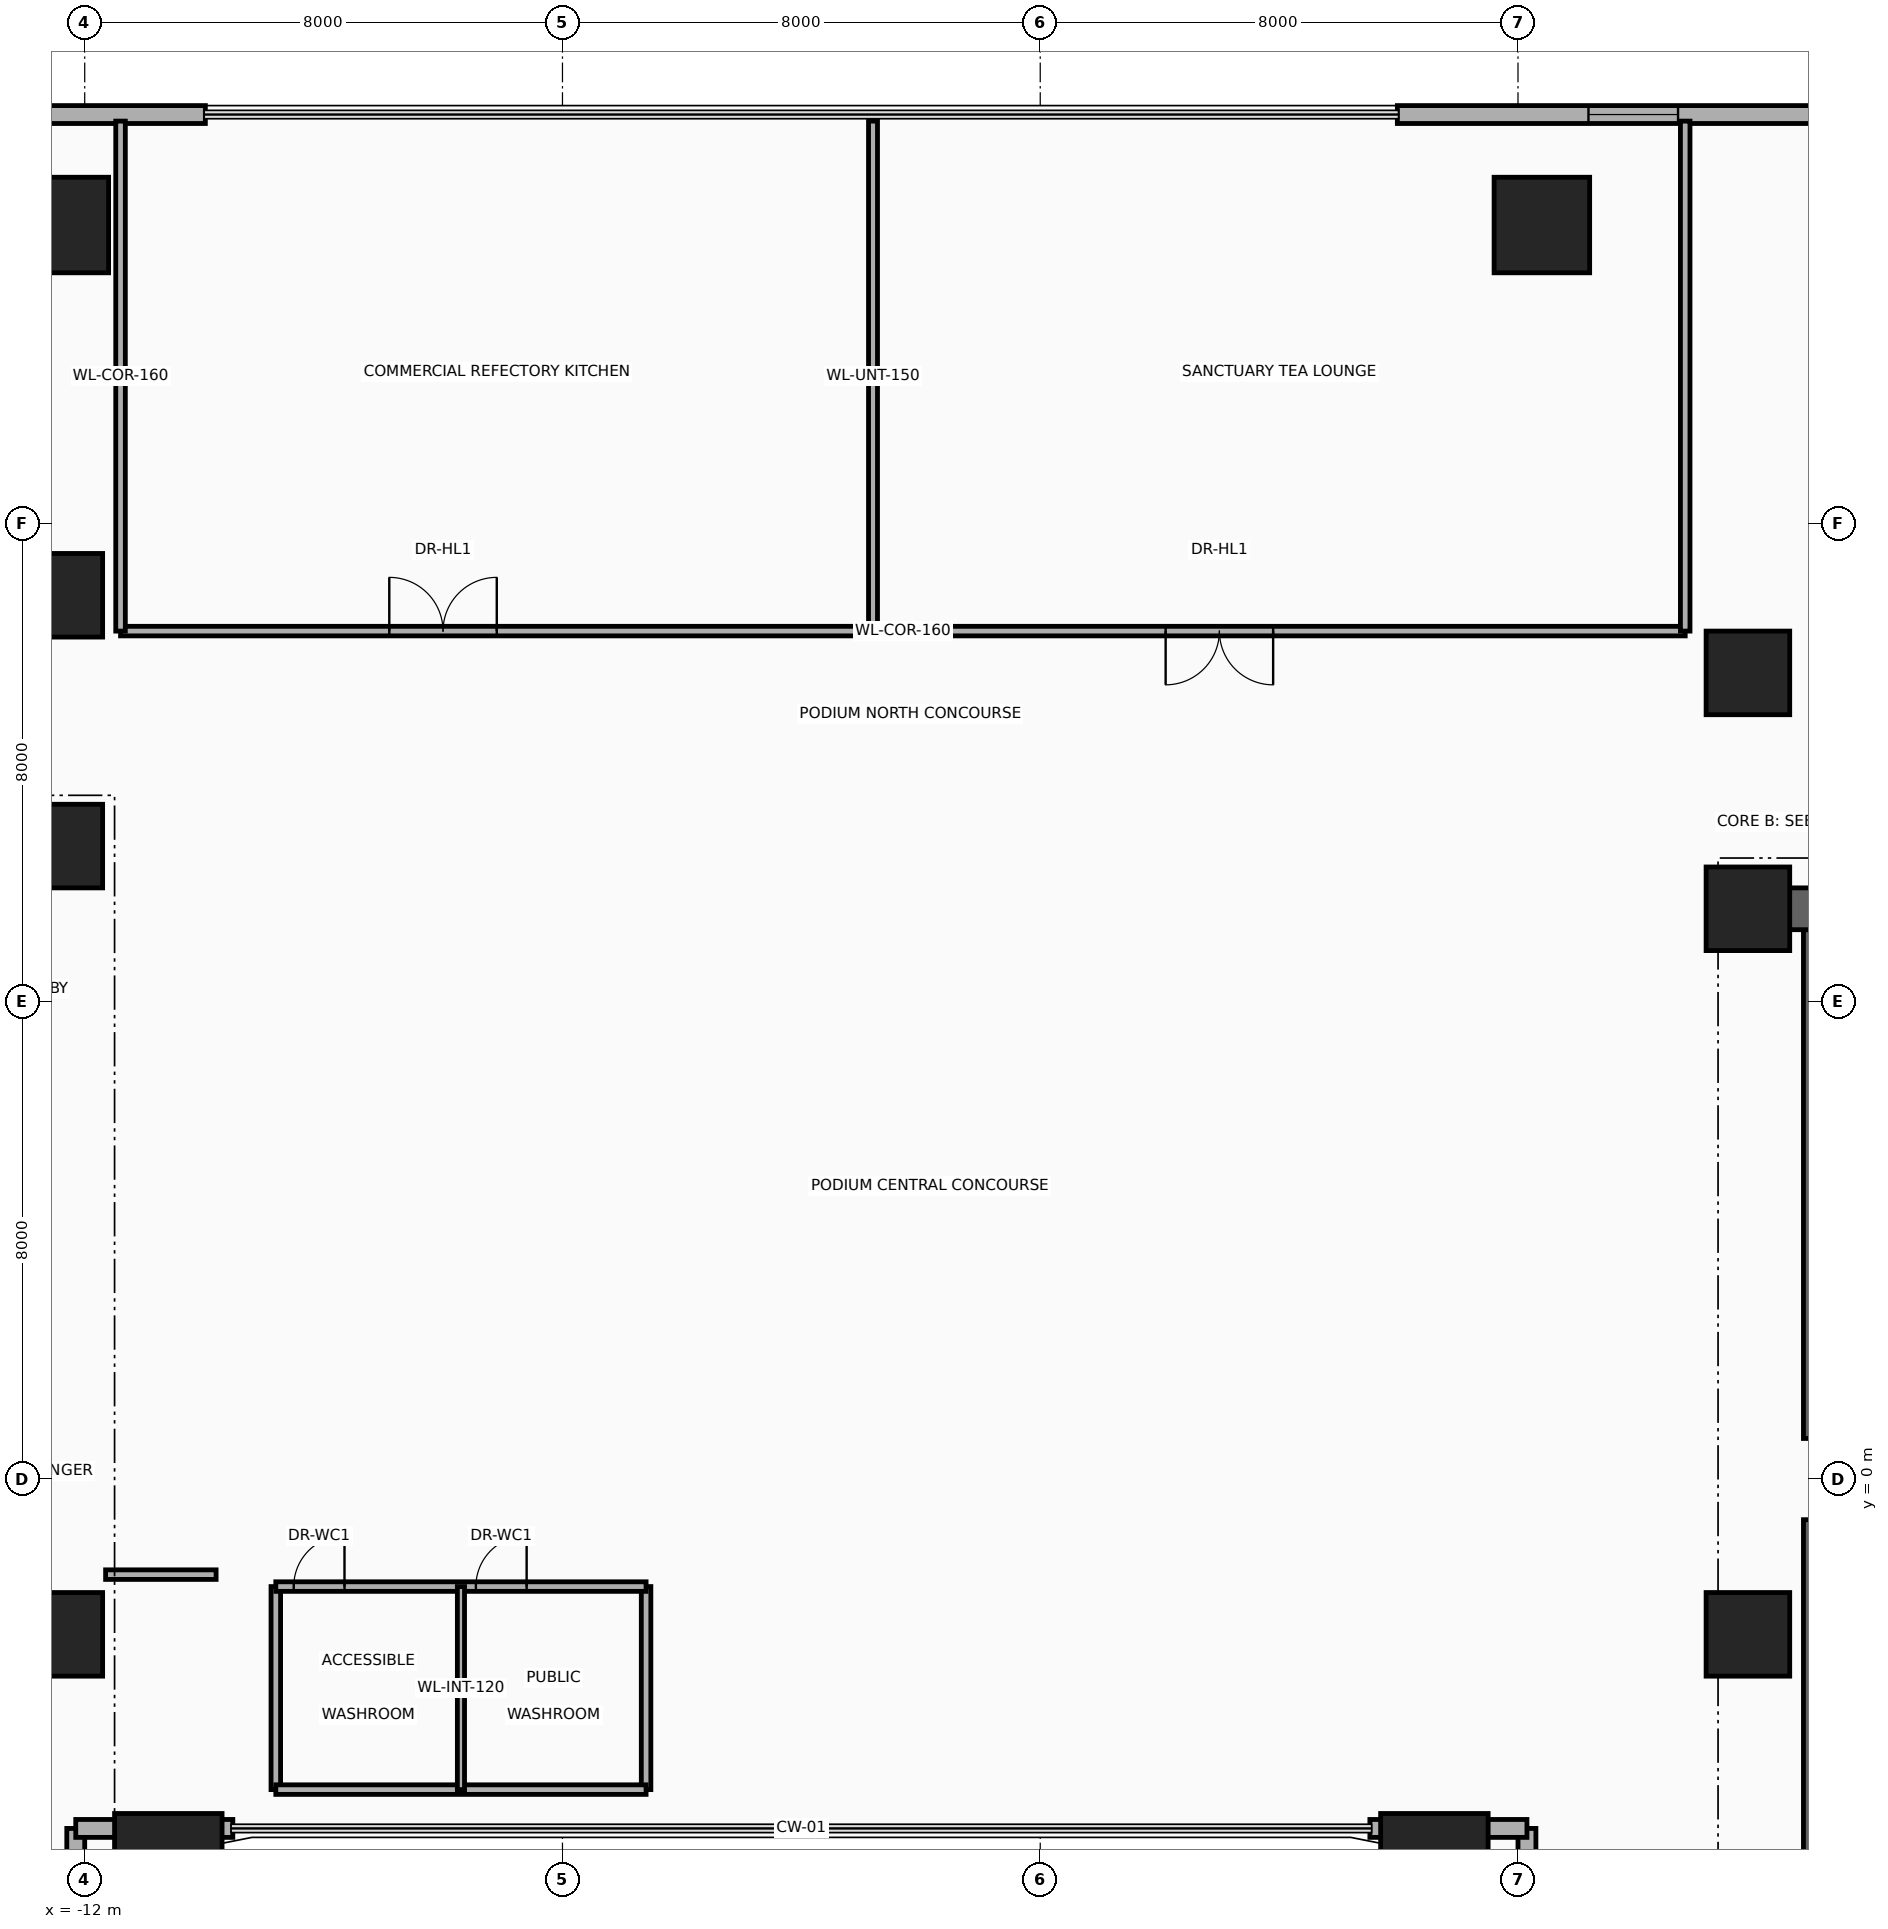
"""IFC4 building model, lengths in metres.
Left out: names, types, materials, properties, quantities, classifications, styles, units other than length and angle.
Written with IfcOpenShell. Run it as: python <this file> out.ifc"""

import sys

from ifc_helpers import new_model, si_unit, direction, frame, frame_2d, origin, origin_2d, place, context, subcontext, project, spatial, rectangle, extrude, source, transform, mapped, element, fill, save


model = new_model("IFC4")
c1 = context("Model", 3, precision=1e-05, world=origin(), true_north=direction((0.0, 1.0)))
c2 = subcontext(c1, "Body", "Model", "MODEL_VIEW")
j1 = project(units=[si_unit("LENGTHUNIT", "METRE"), si_unit("PLANEANGLEUNIT", "RADIAN")], contexts=[c1])
p1 = place(None, origin())
s1 = spatial("IfcSite", under=j1, at=p1, CompositionType="ELEMENT")
p2 = place(p1, origin())
s2 = spatial("IfcBuilding", under=s1, at=p2, CompositionType="ELEMENT")
p3 = place(p2, frame((0.0, 0.0, 10.4)))
s3 = spatial("IfcBuildingStorey", under=s2, at=p3, CompositionType="ELEMENT", Elevation=10.4)
for number, where, z_axis, x_axis in (
    (1, (16.89, 0.68, 0.0), (0.0, 0.0, 1.0), (0.0, 1.0, 0.0)),
    (2, (16.89, -9.2, 0.0), (0.0, 0.0, 1.0), (0.0, 1.0, 0.0)),
):
    element("IfcWall", number, at=place(p3, frame(where, z_axis=z_axis, x_axis=x_axis)), inside=s3, PredefinedType="SHEAR", context=c2, shape_type="SweptSolid", body=[
        extrude(rectangle(XDim=8.52, YDim=0.22, at=frame_2d((4.26, 0.0))), origin(), (0.0, 0.0, 1.0), 4.92),
    ])
p4 = place(p3, frame((-22.65, 10.8, 0.0), z_axis=(0.0, 0.0, 1.0), x_axis=(1.0, 0.0, 0.0)))
e3 = element("IfcWall", 3, at=p4, inside=s3, PredefinedType="SHEAR", context=c2, shape_type="SweptSolid", body=[
    extrude(rectangle(XDim=10.25, YDim=0.7, at=frame_2d((5.125, 0.0))), origin(), (0.0, 0.0, 1.0), 4.92),
])
p5 = place(p3, frame((15.85, 9.55, 0.0), z_axis=(0.0, 0.0, 1.0), x_axis=(1.0, 0.0, 0.0)))
e4 = element("IfcWall", 4, at=p5, inside=s3, PredefinedType="SHEAR", context=c2, shape_type="SweptSolid", body=[
    extrude(rectangle(XDim=9.0, YDim=0.7, at=frame_2d((4.5, 0.0))), origin(), (0.0, 0.0, 1.0), 4.92),
])
m1 = source(origin(), c2, "Body", "SweptSolid", [
    extrude(rectangle(XDim=1.4, YDim=1.4, at=origin_2d()), origin(), (0.0, 0.0, 1.0), 5.2),
])
for number, where, z_axis, x_axis in (
    (5, (-12.4, -2.6, 0.0), (0.0, 0.0, 1.0), (1.0, 0.0, 0.0)),
    (6, (-12.4, 10.6, 0.0), (0.0, 0.0, 1.0), (1.0, 0.0, 0.0)),
    (7, (-12.4, 14.8, 0.0), (0.0, 0.0, 1.0), (1.0, 0.0, 0.0)),
    (8, (15.85, -2.6, 0.0), (0.0, 0.0, 1.0), (1.0, 0.0, 0.0)),
    (9, (15.85, 9.55, 0.0), (0.0, 0.0, 1.0), (1.0, 0.0, 0.0)),
    (10, (15.85, 13.5, 0.0), (0.0, 0.0, 1.0), (1.0, 0.0, 0.0)),
):
    element("IfcColumn", number, at=place(p3, frame(where, z_axis=z_axis, x_axis=x_axis)), inside=s3, PredefinedType="COLUMN", context=c2, shape_type="MappedRepresentation", body=[
        mapped(m1, transform((0.0, 0.0, 0.0), x_axis=(1.0, 0.0, 0.0), y_axis=(0.0, 1.0, 0.0), z_axis=(0.0, 0.0, 1.0), scale=1.0)),
    ])
m2 = source(origin(), c2, "Body", "SweptSolid", [
    extrude(rectangle(XDim=1.8, YDim=1.8, at=origin_2d()), origin(), (0.0, 0.0, 1.0), 5.2),
])
for number, where, z_axis, x_axis in (
    (11, (-10.6, -6.5, 0.0), (0.0, 0.0, 1.0), (1.0, 0.0, 0.0)),
    (12, (10.6, -6.5, 0.0), (0.0, 0.0, 1.0), (1.0, 0.0, 0.0)),
):
    element("IfcColumn", number, at=place(p3, frame(where, z_axis=z_axis, x_axis=x_axis)), inside=s3, PredefinedType="COLUMN", context=c2, shape_type="MappedRepresentation", body=[
        mapped(m2, transform((0.0, 0.0, 0.0), x_axis=(1.0, 0.0, 0.0), y_axis=(0.0, 1.0, 0.0), z_axis=(0.0, 0.0, 1.0), scale=1.0)),
    ])
m3 = source(origin(), c2, "Body", "SweptSolid", [
    extrude(rectangle(XDim=1.6, YDim=1.6, at=origin_2d()), origin(), (0.0, 0.0, 1.0), 5.2),
])
for number, where, z_axis, x_axis in (
    (13, (-12.4, 21.0, 0.0), (0.0, 0.0, 1.0), (1.0, 0.0, 0.0)),
    (14, (12.4, 21.0, 0.0), (0.0, 0.0, 1.0), (1.0, 0.0, 0.0)),
):
    element("IfcColumn", number, at=place(p3, frame(where, z_axis=z_axis, x_axis=x_axis)), inside=s3, PredefinedType="COLUMN", context=c2, shape_type="MappedRepresentation", body=[
        mapped(m3, transform((0.0, 0.0, 0.0), x_axis=(1.0, 0.0, 0.0), y_axis=(0.0, 1.0, 0.0), z_axis=(0.0, 0.0, 1.0), scale=1.0)),
    ])
p6 = place(p3, frame((-33.85, 22.85, 0.0), z_axis=(0.0, 0.0, 1.0), x_axis=(1.0, 0.0, 0.0)))
e15 = element("IfcWall", 15, at=p6, inside=s3, PredefinedType="SOLIDWALL", context=c2, shape_type="SweptSolid", body=[
    extrude(rectangle(XDim=23.87, YDim=0.3, at=frame_2d((11.935, 0.0))), origin(), (0.0, 0.0, 1.0), 4.92),
])
p7 = place(p6, frame((3.2, 0.0, 0.9)))
e16 = element("IfcOpeningElement", 16, at=p7, cuts=e15, PredefinedType="OPENING", context=c2, shape_type="SweptSolid", body=[
    extrude(rectangle(XDim=1.5, YDim=1.75, at=frame_2d((0.75, 0.875))), frame((0.0, 0.165, 0.0), z_axis=(0.0, -1.0, 0.0), x_axis=(1.0, 0.0, 0.0)), (0.0, 0.0, 1.0), 0.33),
])
p8 = place(p6, frame((10.0, 0.0, 0.9)))
e17 = element("IfcOpeningElement", 17, at=p8, cuts=e15, PredefinedType="OPENING", context=c2, shape_type="SweptSolid", body=[
    extrude(rectangle(XDim=1.5, YDim=1.75, at=frame_2d((0.75, 0.875))), frame((0.0, 0.165, 0.0), z_axis=(0.0, -1.0, 0.0), x_axis=(1.0, 0.0, 0.0)), (0.0, 0.0, 1.0), 0.33),
])
p9 = place(p6, frame((17.8, 0.0, 0.9)))
e18 = element("IfcOpeningElement", 18, at=p9, cuts=e15, PredefinedType="OPENING", context=c2, shape_type="SweptSolid", body=[
    extrude(rectangle(XDim=1.5, YDim=1.75, at=frame_2d((0.75, 0.875))), frame((0.0, 0.165, 0.0), z_axis=(0.0, -1.0, 0.0), x_axis=(1.0, 0.0, 0.0)), (0.0, 0.0, 1.0), 0.33),
])
p10 = place(p3, frame((9.98, 22.85, 0.0), z_axis=(0.0, 0.0, 1.0), x_axis=(1.0, 0.0, 0.0)))
e19 = element("IfcWall", 19, at=p10, inside=s3, PredefinedType="SOLIDWALL", context=c2, shape_type="SweptSolid", body=[
    extrude(rectangle(XDim=23.87, YDim=0.3, at=frame_2d((11.935, 0.0))), origin(), (0.0, 0.0, 1.0), 4.92),
])
p11 = place(p10, frame((3.2, 0.0, 0.9)))
e20 = element("IfcOpeningElement", 20, at=p11, cuts=e19, PredefinedType="OPENING", context=c2, shape_type="SweptSolid", body=[
    extrude(rectangle(XDim=1.5, YDim=1.75, at=frame_2d((0.75, 0.875))), frame((0.0, 0.165, 0.0), z_axis=(0.0, -1.0, 0.0), x_axis=(1.0, 0.0, 0.0)), (0.0, 0.0, 1.0), 0.33),
])
p12 = place(p10, frame((10.0, 0.0, 0.9)))
e21 = element("IfcOpeningElement", 21, at=p12, cuts=e19, PredefinedType="OPENING", context=c2, shape_type="SweptSolid", body=[
    extrude(rectangle(XDim=1.5, YDim=1.75, at=frame_2d((0.75, 0.875))), frame((0.0, 0.165, 0.0), z_axis=(0.0, -1.0, 0.0), x_axis=(1.0, 0.0, 0.0)), (0.0, 0.0, 1.0), 0.33),
])
p13 = place(p10, frame((17.8, 0.0, 0.9)))
e22 = element("IfcOpeningElement", 22, at=p13, cuts=e19, PredefinedType="OPENING", context=c2, shape_type="SweptSolid", body=[
    extrude(rectangle(XDim=1.5, YDim=1.75, at=frame_2d((0.75, 0.875))), frame((0.0, 0.165, 0.0), z_axis=(0.0, -1.0, 0.0), x_axis=(1.0, 0.0, 0.0)), (0.0, 0.0, 1.0), 0.33),
])
for number, where, z_axis, x_axis in (
    (23, (-12.15, -22.85, 0.0), (0.0, 0.0, 1.0), (0.0, 1.0, 0.0)),
    (24, (12.15, -22.85, 0.0), (0.0, 0.0, 1.0), (0.0, 1.0, 0.0)),
):
    element("IfcWall", number, at=place(p3, frame(where, z_axis=z_axis, x_axis=x_axis)), inside=s3, PredefinedType="SOLIDWALL", context=c2, shape_type="SweptSolid", body=[
        extrude(rectangle(XDim=17.0, YDim=0.3, at=frame_2d((8.5, 0.0))), origin(), (0.0, 0.0, 1.0), 3.957),
    ])
for number, where, z_axis, x_axis in (
    (25, (-12.15, -5.85, 0.0), (0.0, 0.0, 1.0), (1.0, 0.0, 0.0)),
    (26, (9.52, -5.85, 0.0), (0.0, 0.0, 1.0), (1.0, 0.0, 0.0)),
):
    element("IfcWall", number, at=place(p3, frame(where, z_axis=z_axis, x_axis=x_axis)), inside=s3, PredefinedType="SOLIDWALL", context=c2, shape_type="SweptSolid", body=[
        extrude(rectangle(XDim=2.63, YDim=0.3, at=frame_2d((1.315, 0.0))), origin(), (0.0, 0.0, 1.0), 4.92),
    ])
p14 = place(p3, frame((-11.4, 14.2, 0.0), z_axis=(0.0, 0.0, 1.0), x_axis=(1.0, 0.0, 0.0)))
e27 = element("IfcWall", 27, at=p14, inside=s3, PredefinedType="PARTITIONING", context=c2, shape_type="SweptSolid", body=[
    extrude(rectangle(XDim=26.2, YDim=0.16, at=frame_2d((13.1, 0.0))), origin(), (0.0, 0.0, 1.0), 4.92),
])
p15 = place(p14, frame((4.5, 0.0, 0.0)))
e28 = element("IfcOpeningElement", 28, at=p15, cuts=e27, PredefinedType="OPENING", context=c2, shape_type="SweptSolid", body=[
    extrude(rectangle(XDim=1.8, YDim=2.15, at=frame_2d((0.9, 1.075))), frame((0.0, 0.095, 0.0), z_axis=(0.0, -1.0, 0.0), x_axis=(1.0, 0.0, 0.0)), (0.0, 0.0, 1.0), 0.19),
])
p16 = place(p14, frame((17.5, 0.0, 0.0)))
e29 = element("IfcOpeningElement", 29, at=p16, cuts=e27, PredefinedType="OPENING", context=c2, shape_type="SweptSolid", body=[
    extrude(rectangle(XDim=1.8, YDim=2.15, at=frame_2d((0.9, 1.075))), frame((0.0, 0.095, 0.0), z_axis=(0.0, -1.0, 0.0), x_axis=(1.0, 0.0, 0.0)), (0.0, 0.0, 1.0), 0.19),
])
for number, where, z_axis, x_axis in (
    (30, (-11.4, 14.2, 0.0), (0.0, 0.0, 1.0), (0.0, 1.0, 0.0)),
    (31, (14.8, 14.2, 0.0), (0.0, 0.0, 1.0), (0.0, 1.0, 0.0)),
):
    element("IfcWall", number, at=place(p3, frame(where, z_axis=z_axis, x_axis=x_axis)), inside=s3, PredefinedType="PARTITIONING", context=c2, shape_type="SweptSolid", body=[
        extrude(rectangle(XDim=8.54, YDim=0.16, at=frame_2d((4.27, 0.0))), origin(), (0.0, 0.0, 1.0), 3.957),
    ])
p17 = place(p3, frame((1.2, 14.2, 0.0), z_axis=(0.0, 0.0, 1.0), x_axis=(0.0, 1.0, 0.0)))
e32 = element("IfcWall", 32, at=p17, inside=s3, PredefinedType="PARTITIONING", context=c2, shape_type="SweptSolid", body=[
    extrude(rectangle(XDim=8.54, YDim=0.15, at=frame_2d((4.27, 0.0))), origin(), (0.0, 0.0, 1.0), 3.957),
])
for number, where, z_axis, x_axis in (
    (33, (-8.8, -5.2, 0.0), (0.0, 0.0, 1.0), (0.0, 1.0, 0.0)),
    (34, (-2.6, -5.2, 0.0), (0.0, 0.0, 1.0), (0.0, 1.0, 0.0)),
):
    element("IfcWall", number, at=place(p3, frame(where, z_axis=z_axis, x_axis=x_axis)), inside=s3, PredefinedType="PARTITIONING", context=c2, shape_type="SweptSolid", body=[
        extrude(rectangle(XDim=3.4, YDim=0.16, at=frame_2d((1.7, 0.0))), origin(), (0.0, 0.0, 1.0), 4.92),
    ])
p18 = place(p3, frame((-8.8, -5.2, 0.0), z_axis=(0.0, 0.0, 1.0), x_axis=(1.0, 0.0, 0.0)))
e35 = element("IfcWall", 35, at=p18, inside=s3, PredefinedType="PARTITIONING", context=c2, shape_type="SweptSolid", body=[
    extrude(rectangle(XDim=6.2, YDim=0.16, at=frame_2d((3.1, 0.0))), origin(), (0.0, 0.0, 1.0), 4.92),
])
p19 = place(p3, frame((-8.8, -1.8, 0.0), z_axis=(0.0, 0.0, 1.0), x_axis=(1.0, 0.0, 0.0)))
e36 = element("IfcWall", 36, at=p19, inside=s3, PredefinedType="PARTITIONING", context=c2, shape_type="SweptSolid", body=[
    extrude(rectangle(XDim=6.2, YDim=0.16, at=frame_2d((3.1, 0.0))), origin(), (0.0, 0.0, 1.0), 4.92),
])
p20 = place(p19, frame((0.3, 0.0, 0.0)))
e37 = element("IfcOpeningElement", 37, at=p20, cuts=e36, PredefinedType="OPENING", context=c2, shape_type="SweptSolid", body=[
    extrude(rectangle(XDim=0.85, YDim=2.1, at=frame_2d((0.425, 1.05))), frame((0.0, 0.095, 0.0), z_axis=(0.0, -1.0, 0.0), x_axis=(1.0, 0.0, 0.0)), (0.0, 0.0, 1.0), 0.19),
])
p21 = place(p19, frame((3.35, 0.0, 0.0)))
e38 = element("IfcOpeningElement", 38, at=p21, cuts=e36, PredefinedType="OPENING", context=c2, shape_type="SweptSolid", body=[
    extrude(rectangle(XDim=0.85, YDim=2.1, at=frame_2d((0.425, 1.05))), frame((0.0, 0.095, 0.0), z_axis=(0.0, -1.0, 0.0), x_axis=(1.0, 0.0, 0.0)), (0.0, 0.0, 1.0), 0.19),
])
p22 = place(p3, frame((-5.7, -5.2, 0.0), z_axis=(0.0, 0.0, 1.0), x_axis=(0.0, 1.0, 0.0)))
e39 = element("IfcWall", 39, at=p22, inside=s3, PredefinedType="PARTITIONING", context=c2, shape_type="SweptSolid", body=[
    extrude(rectangle(XDim=3.4, YDim=0.12, at=frame_2d((1.7, 0.0))), origin(), (0.0, 0.0, 1.0), 4.92),
])
p23 = place(p3, frame((-11.65, -1.6, 0.0), z_axis=(0.0, 0.0, 1.0), x_axis=(1.0, 0.0, 0.0)))
e40 = element("IfcWall", 40, at=p23, inside=s3, PredefinedType="PARTITIONING", context=c2, shape_type="SweptSolid", body=[
    extrude(rectangle(XDim=1.85, YDim=0.16, at=frame_2d((0.925, 0.0))), origin(), (0.0, 0.0, 1.0), 4.92),
])
p24 = place(p11, origin())
e41 = element("IfcWindow", 41, at=p24, inside=s3, PartitioningType="SINGLE_PANEL", PredefinedType="WINDOW", context=c2, shape_type="SweptSolid", body=[
    extrude(rectangle(XDim=1.5, YDim=1.75, at=frame_2d((0.75, 0.875))), frame((0.0, 0.03, 0.0), z_axis=(0.0, -1.0, 0.0), x_axis=(1.0, 0.0, 0.0)), (0.0, 0.0, 1.0), 0.06),
])
fill(e20, e41)
p25 = place(p15, origin())
e42 = element("IfcDoor", 42, at=p25, inside=s3, OperationType="DOUBLE_DOOR_SINGLE_SWING", PredefinedType="DOOR", context=c2, shape_type="SweptSolid", body=[
    extrude(rectangle(XDim=1.8, YDim=2.15, at=frame_2d((0.9, 1.075))), frame((0.0, 0.025, 0.0), z_axis=(0.0, -1.0, 0.0), x_axis=(1.0, 0.0, 0.0)), (0.0, 0.0, 1.0), 0.05),
])
fill(e28, e42)
p26 = place(p16, frame((1.8, 0.0, 0.0), z_axis=(0.0, 0.0, 1.0), x_axis=(-1.0, 0.0, 0.0)))
e43 = element("IfcDoor", 43, at=p26, inside=s3, OperationType="DOUBLE_DOOR_SINGLE_SWING", PredefinedType="DOOR", context=c2, shape_type="SweptSolid", body=[
    extrude(rectangle(XDim=1.8, YDim=2.15, at=frame_2d((0.9, 1.075))), frame((0.0, 0.025, 0.0), z_axis=(0.0, -1.0, 0.0), x_axis=(1.0, 0.0, 0.0)), (0.0, 0.0, 1.0), 0.05),
])
fill(e29, e43)
p27 = place(p20, origin())
e44 = element("IfcDoor", 44, at=p27, inside=s3, OperationType="SINGLE_SWING_RIGHT", PredefinedType="DOOR", context=c2, shape_type="SweptSolid", body=[
    extrude(rectangle(XDim=0.85, YDim=2.1, at=frame_2d((0.425, 1.05))), frame((0.0, 0.025, 0.0), z_axis=(0.0, -1.0, 0.0), x_axis=(1.0, 0.0, 0.0)), (0.0, 0.0, 1.0), 0.05),
])
fill(e37, e44)
p28 = place(p21, origin())
e45 = element("IfcDoor", 45, at=p28, inside=s3, OperationType="SINGLE_SWING_LEFT", PredefinedType="DOOR", context=c2, shape_type="SweptSolid", body=[
    extrude(rectangle(XDim=0.85, YDim=2.1, at=frame_2d((0.425, 1.05))), frame((0.0, 0.025, 0.0), z_axis=(0.0, -1.0, 0.0), x_axis=(1.0, 0.0, 0.0)), (0.0, 0.0, 1.0), 0.05),
])
fill(e38, e45)
save(model, sys.argv[1])
